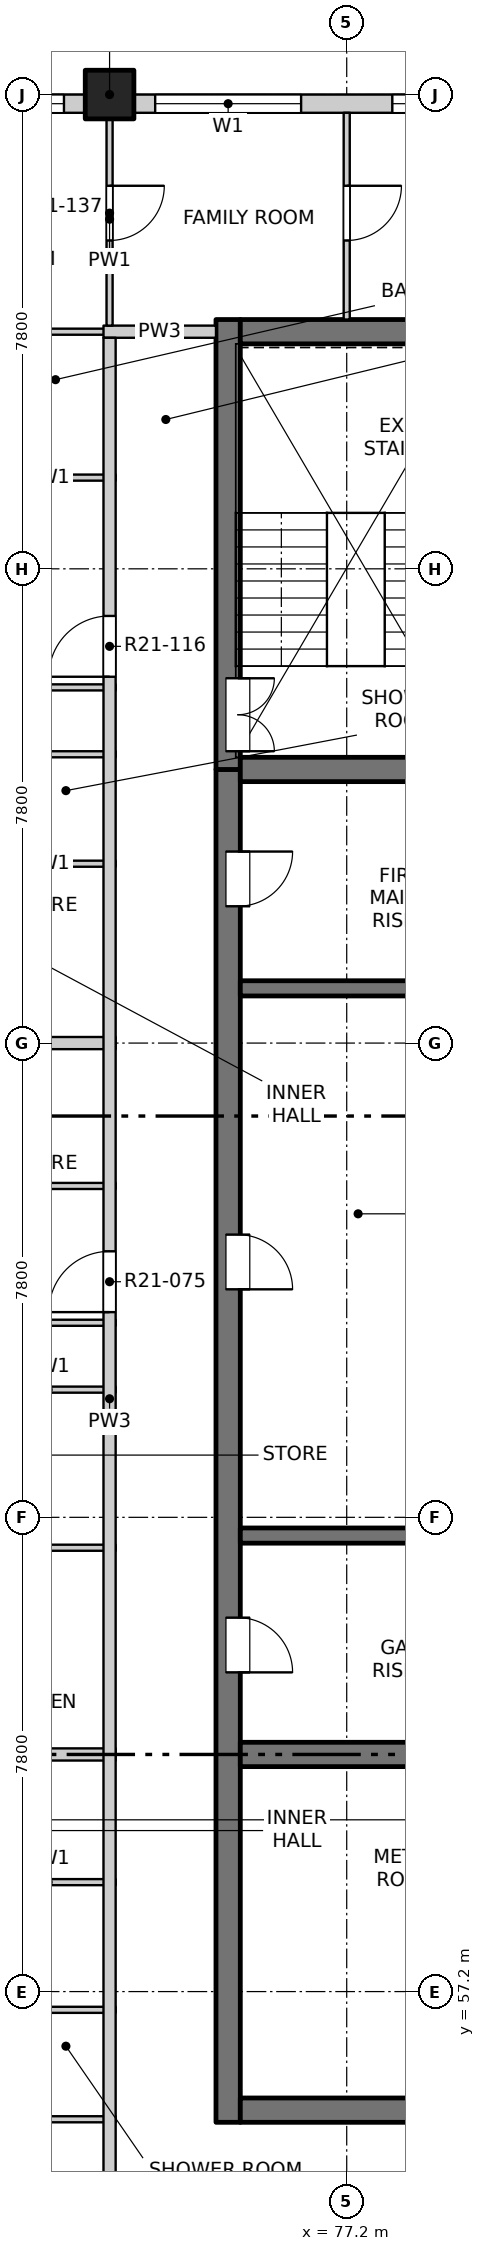
"""IFC4 building model, lengths in metres.
Left out: names, types, materials, properties, quantities, classifications, styles, units other than length and angle.
Written with IfcOpenShell. Run it as: python <this file> out.ifc"""

import sys

from ifc_helpers import new_model, si_unit, direction, frame, frame_2d, origin, origin_2d, place, context, subcontext, project, spatial, rectangle, extrude, element, fill, save


model = new_model("IFC4")
c1 = context("Model", 3, precision=1e-05, world=origin(), true_north=direction((0.0, 1.0)))
c2 = subcontext(c1, "Body", "Model", "MODEL_VIEW")
j1 = project(units=[si_unit("LENGTHUNIT", "METRE"), si_unit("PLANEANGLEUNIT", "RADIAN")], contexts=[c1])
p1 = place(None, origin())
s1 = spatial("IfcSite", under=j1, at=p1, CompositionType="ELEMENT")
p2 = place(p1, origin())
s2 = spatial("IfcBuilding", under=s1, at=p2, CompositionType="ELEMENT")
p3 = place(p2, frame((0.0, 0.0, 221.1)))
s3 = spatial("IfcBuildingStorey", under=s2, at=p3, CompositionType="ELEMENT", Elevation=221.1)
p4 = place(p3, frame((73.3, 88.4, -0.25), z_axis=(0.0, 0.0, 1.0), x_axis=(1.0, 0.0, 0.0)))
e1 = element("IfcColumn", 1, at=p4, inside=s3, PredefinedType="COLUMN", context=c2, shape_type="SweptSolid", body=[
    extrude(rectangle(XDim=0.8, YDim=0.8, at=origin_2d()), origin(), (0.0, 0.0, 1.0), 3.4),
])
p5 = place(p3, frame((75.25, 55.05, -0.25), z_axis=(0.0, 0.0, 1.0), x_axis=(0.0, 1.0, 0.0)))
e2 = element("IfcWall", 2, at=p5, inside=s3, PredefinedType="SOLIDWALL", context=c2, shape_type="SweptSolid", body=[
    extrude(rectangle(XDim=22.25, YDim=0.4, at=frame_2d((11.125, 0.0))), origin(), (0.0, 0.0, 1.0), 3.4),
])
p6 = place(p5, frame((7.4, 0.0, 0.25)))
e3 = element("IfcOpeningElement", 3, at=p6, cuts=e2, PredefinedType="OPENING", context=c2, shape_type="SweptSolid", body=[
    extrude(rectangle(XDim=0.9, YDim=2.1, at=frame_2d((0.45, 1.05))), frame((0.0, 0.21, 0.0), z_axis=(0.0, -1.0, 0.0), x_axis=(1.0, 0.0, 0.0)), (0.0, 0.0, 1.0), 0.42),
])
p7 = place(p5, frame((13.7, 0.0, 0.25)))
e4 = element("IfcOpeningElement", 4, at=p7, cuts=e2, PredefinedType="OPENING", context=c2, shape_type="SweptSolid", body=[
    extrude(rectangle(XDim=0.9, YDim=2.1, at=frame_2d((0.45, 1.05))), frame((0.0, 0.21, 0.0), z_axis=(0.0, -1.0, 0.0), x_axis=(1.0, 0.0, 0.0)), (0.0, 0.0, 1.0), 0.42),
])
p8 = place(p5, frame((20.0, 0.0, 0.25)))
e5 = element("IfcOpeningElement", 5, at=p8, cuts=e2, PredefinedType="OPENING", context=c2, shape_type="SweptSolid", body=[
    extrude(rectangle(XDim=0.9, YDim=2.1, at=frame_2d((0.45, 1.05))), frame((0.0, 0.21, 0.0), z_axis=(0.0, -1.0, 0.0), x_axis=(1.0, 0.0, 0.0)), (0.0, 0.0, 1.0), 0.42),
])
p9 = place(p3, frame((75.25, 77.3, -0.25), z_axis=(0.0, 0.0, 1.0), x_axis=(0.0, 1.0, 0.0)))
e6 = element("IfcWall", 6, at=p9, inside=s3, PredefinedType="SOLIDWALL", context=c2, shape_type="SweptSolid", body=[
    extrude(rectangle(XDim=7.4, YDim=0.4, at=frame_2d((3.7, 0.0))), origin(), (0.0, 0.0, 1.0), 3.4),
])
p10 = place(p9, frame((0.3, 0.0, 0.25)))
e7 = element("IfcOpeningElement", 7, at=p10, cuts=e6, PredefinedType="OPENING", context=c2, shape_type="SweptSolid", body=[
    extrude(rectangle(XDim=1.2, YDim=2.1, at=frame_2d((0.6, 1.05))), frame((0.0, 0.21, 0.0), z_axis=(0.0, -1.0, 0.0), x_axis=(1.0, 0.0, 0.0)), (0.0, 0.0, 1.0), 0.42),
])
p11 = place(p3, frame((75.45, 55.25, -0.25), z_axis=(0.0, 0.0, 1.0), x_axis=(1.0, 0.0, 0.0)))
e8 = element("IfcWall", 8, at=p11, inside=s3, PredefinedType="SOLIDWALL", context=c2, shape_type="SweptSolid", body=[
    extrude(rectangle(XDim=19.1, YDim=0.4, at=frame_2d((9.55, 0.0))), origin(), (0.0, 0.0, 1.0), 3.4),
])
p12 = place(p11, frame((8.8, 0.0, 0.25)))
e9 = element("IfcOpeningElement", 9, at=p12, cuts=e8, PredefinedType="OPENING", context=c2, shape_type="SweptSolid", body=[
    extrude(rectangle(XDim=1.5, YDim=2.1, at=frame_2d((0.75, 1.05))), frame((0.0, 0.21, 0.0), z_axis=(0.0, -1.0, 0.0), x_axis=(1.0, 0.0, 0.0)), (0.0, 0.0, 1.0), 0.42),
])
p13 = place(p3, frame((75.45, 84.5, -0.25), z_axis=(0.0, 0.0, 1.0), x_axis=(1.0, 0.0, 0.0)))
e10 = element("IfcWall", 10, at=p13, inside=s3, PredefinedType="SOLIDWALL", context=c2, shape_type="SweptSolid", body=[
    extrude(rectangle(XDim=19.1, YDim=0.4, at=frame_2d((9.55, 0.0))), origin(), (0.0, 0.0, 1.0), 3.4),
])
p14 = place(p3, frame((75.45, 61.1, -0.25), z_axis=(0.0, 0.0, 1.0), x_axis=(1.0, 0.0, 0.0)))
e11 = element("IfcWall", 11, at=p14, inside=s3, PredefinedType="SOLIDWALL", context=c2, shape_type="SweptSolid", body=[
    extrude(rectangle(XDim=3.875, YDim=0.4, at=frame_2d((1.938, 0.0))), origin(), (0.0, 0.0, 1.0), 3.4),
])
for number, where, z_axis, x_axis in (
    (12, (75.45, 64.7, -0.25), (0.0, 0.0, 1.0), (1.0, 0.0, 0.0)),
    (13, (75.45, 73.7, -0.25), (0.0, 0.0, 1.0), (1.0, 0.0, 0.0)),
):
    element("IfcWall", number, at=place(p3, frame(where, z_axis=z_axis, x_axis=x_axis)), inside=s3, PredefinedType="SOLIDWALL", context=c2, shape_type="SweptSolid", body=[
        extrude(rectangle(XDim=3.875, YDim=0.25, at=frame_2d((1.938, 0.0))), origin(), (0.0, 0.0, 1.0), 3.4),
    ])
p15 = place(p3, frame((75.45, 77.3, -0.25), z_axis=(0.0, 0.0, 1.0), x_axis=(1.0, 0.0, 0.0)))
e14 = element("IfcWall", 14, at=p15, inside=s3, PredefinedType="SOLIDWALL", context=c2, shape_type="SweptSolid", body=[
    extrude(rectangle(XDim=3.875, YDim=0.4, at=frame_2d((1.938, 0.0))), origin(), (0.0, 0.0, 1.0), 3.4),
])
p16 = place(p3, frame((65.5, 88.25, 0.0), z_axis=(0.0, 0.0, 1.0), x_axis=(1.0, 0.0, 0.0)))
e15 = element("IfcWall", 15, at=p16, inside=s3, PredefinedType="SOLIDWALL", context=c2, shape_type="SweptSolid", body=[
    extrude(rectangle(XDim=7.4, YDim=0.3, at=frame_2d((3.7, 0.0))), origin(), (0.0, 0.0, 1.0), 2.7),
])
p17 = place(p16, frame((0.75, 0.0, 0.9)))
e16 = element("IfcOpeningElement", 16, at=p17, cuts=e15, PredefinedType="OPENING", context=c2, shape_type="SweptSolid", body=[
    extrude(rectangle(XDim=2.4, YDim=1.8, at=frame_2d((1.2, 0.9))), frame((0.0, 0.16, 0.0), z_axis=(0.0, -1.0, 0.0), x_axis=(1.0, 0.0, 0.0)), (0.0, 0.0, 1.0), 0.32),
])
p18 = place(p16, frame((4.65, 0.0, 0.9)))
e17 = element("IfcOpeningElement", 17, at=p18, cuts=e15, PredefinedType="OPENING", context=c2, shape_type="SweptSolid", body=[
    extrude(rectangle(XDim=2.4, YDim=1.8, at=frame_2d((1.2, 0.9))), frame((0.0, 0.16, 0.0), z_axis=(0.0, -1.0, 0.0), x_axis=(1.0, 0.0, 0.0)), (0.0, 0.0, 1.0), 0.32),
])
p19 = place(p3, frame((73.7, 88.25, 0.0), z_axis=(0.0, 0.0, 1.0), x_axis=(1.0, 0.0, 0.0)))
e18 = element("IfcWall", 18, at=p19, inside=s3, PredefinedType="SOLIDWALL", context=c2, shape_type="SweptSolid", body=[
    extrude(rectangle(XDim=22.6, YDim=0.3, at=frame_2d((11.3, 0.0))), origin(), (0.0, 0.0, 1.0), 2.7),
])
p20 = place(p19, frame((0.35, 0.0, 0.9)))
e19 = element("IfcOpeningElement", 19, at=p20, cuts=e18, PredefinedType="OPENING", context=c2, shape_type="SweptSolid", body=[
    extrude(rectangle(XDim=2.4, YDim=1.8, at=frame_2d((1.2, 0.9))), frame((0.0, 0.16, 0.0), z_axis=(0.0, -1.0, 0.0), x_axis=(1.0, 0.0, 0.0)), (0.0, 0.0, 1.0), 0.32),
])
p21 = place(p19, frame((4.25, 0.0, 0.9)))
e20 = element("IfcOpeningElement", 20, at=p21, cuts=e18, PredefinedType="OPENING", context=c2, shape_type="SweptSolid", body=[
    extrude(rectangle(XDim=2.4, YDim=1.8, at=frame_2d((1.2, 0.9))), frame((0.0, 0.16, 0.0), z_axis=(0.0, -1.0, 0.0), x_axis=(1.0, 0.0, 0.0)), (0.0, 0.0, 1.0), 0.32),
])
p22 = place(p19, frame((8.15, 0.0, 0.9)))
e21 = element("IfcOpeningElement", 21, at=p22, cuts=e18, PredefinedType="OPENING", context=c2, shape_type="SweptSolid", body=[
    extrude(rectangle(XDim=2.4, YDim=1.8, at=frame_2d((1.2, 0.9))), frame((0.0, 0.16, 0.0), z_axis=(0.0, -1.0, 0.0), x_axis=(1.0, 0.0, 0.0)), (0.0, 0.0, 1.0), 0.32),
])
p23 = place(p19, frame((12.05, 0.0, 0.9)))
e22 = element("IfcOpeningElement", 22, at=p23, cuts=e18, PredefinedType="OPENING", context=c2, shape_type="SweptSolid", body=[
    extrude(rectangle(XDim=2.4, YDim=1.8, at=frame_2d((1.2, 0.9))), frame((0.0, 0.16, 0.0), z_axis=(0.0, -1.0, 0.0), x_axis=(1.0, 0.0, 0.0)), (0.0, 0.0, 1.0), 0.32),
])
p24 = place(p19, frame((15.95, 0.0, 0.9)))
e23 = element("IfcOpeningElement", 23, at=p24, cuts=e18, PredefinedType="OPENING", context=c2, shape_type="SweptSolid", body=[
    extrude(rectangle(XDim=2.4, YDim=1.8, at=frame_2d((1.2, 0.9))), frame((0.0, 0.16, 0.0), z_axis=(0.0, -1.0, 0.0), x_axis=(1.0, 0.0, 0.0)), (0.0, 0.0, 1.0), 0.32),
])
p25 = place(p19, frame((19.85, 0.0, 0.9)))
e24 = element("IfcOpeningElement", 24, at=p25, cuts=e18, PredefinedType="OPENING", context=c2, shape_type="SweptSolid", body=[
    extrude(rectangle(XDim=2.4, YDim=1.8, at=frame_2d((1.2, 0.9))), frame((0.0, 0.16, 0.0), z_axis=(0.0, -1.0, 0.0), x_axis=(1.0, 0.0, 0.0)), (0.0, 0.0, 1.0), 0.32),
])
for number, where, z_axis, x_axis in (
    (25, (71.18, 55.1, 0.0), (0.0, 0.0, 1.0), (1.0, 0.0, 0.0)),
    (26, (71.18, 56.9, 0.0), (0.0, 0.0, 1.0), (1.0, 0.0, 0.0)),
    (27, (71.18, 59.0, 0.0), (0.0, 0.0, 1.0), (1.0, 0.0, 0.0)),
):
    element("IfcWall", number, at=place(p3, frame(where, z_axis=z_axis, x_axis=x_axis)), inside=s3, PredefinedType="PARTITIONING", context=c2, shape_type="SweptSolid", body=[
        extrude(rectangle(XDim=2.22, YDim=0.1, at=frame_2d((1.11, 0.0))), origin(), (0.0, 0.0, 1.0), 3.15),
    ])
p26 = place(p3, frame((61.9, 61.1, 0.0), z_axis=(0.0, 0.0, 1.0), x_axis=(1.0, 0.0, 0.0)))
e28 = element("IfcWall", 28, at=p26, inside=s3, PredefinedType="PARTITIONING", context=c2, shape_type="SweptSolid", body=[
    extrude(rectangle(XDim=11.5, YDim=0.2, at=frame_2d((5.75, 0.0))), origin(), (0.0, 0.0, 1.0), 2.55),
])
for number, where, z_axis, x_axis in (
    (29, (71.18, 64.5, 0.0), (0.0, 0.0, 1.0), (1.0, 0.0, 0.0)),
    (30, (71.18, 67.1, 0.0), (0.0, 0.0, 1.0), (1.0, 0.0, 0.0)),
    (31, (71.18, 68.2, 0.0), (0.0, 0.0, 1.0), (1.0, 0.0, 0.0)),
    (32, (71.18, 70.45, 0.0), (0.0, 0.0, 1.0), (1.0, 0.0, 0.0)),
):
    element("IfcWall", number, at=place(p3, frame(where, z_axis=z_axis, x_axis=x_axis)), inside=s3, PredefinedType="PARTITIONING", context=c2, shape_type="SweptSolid", body=[
        extrude(rectangle(XDim=2.22, YDim=0.1, at=frame_2d((1.11, 0.0))), origin(), (0.0, 0.0, 1.0), 3.15),
    ])
p27 = place(p3, frame((61.9, 72.8, 0.0), z_axis=(0.0, 0.0, 1.0), x_axis=(1.0, 0.0, 0.0)))
e33 = element("IfcWall", 33, at=p27, inside=s3, PredefinedType="PARTITIONING", context=c2, shape_type="SweptSolid", body=[
    extrude(rectangle(XDim=11.5, YDim=0.2, at=frame_2d((5.75, 0.0))), origin(), (0.0, 0.0, 1.0), 3.15),
])
for number, where, z_axis, x_axis in (
    (34, (71.18, 75.75, 0.0), (0.0, 0.0, 1.0), (1.0, 0.0, 0.0)),
    (35, (71.18, 77.55, 0.0), (0.0, 0.0, 1.0), (1.0, 0.0, 0.0)),
    (36, (71.18, 78.65, 0.0), (0.0, 0.0, 1.0), (1.0, 0.0, 0.0)),
    (37, (71.18, 82.1, 0.0), (0.0, 0.0, 1.0), (1.0, 0.0, 0.0)),
):
    element("IfcWall", number, at=place(p3, frame(where, z_axis=z_axis, x_axis=x_axis)), inside=s3, PredefinedType="PARTITIONING", context=c2, shape_type="SweptSolid", body=[
        extrude(rectangle(XDim=2.22, YDim=0.1, at=frame_2d((1.11, 0.0))), origin(), (0.0, 0.0, 1.0), 3.15),
    ])
p28 = place(p3, frame((61.9, 84.5, 0.0), z_axis=(0.0, 0.0, 1.0), x_axis=(1.0, 0.0, 0.0)))
e38 = element("IfcWall", 38, at=p28, inside=s3, PredefinedType="PARTITIONING", context=c2, shape_type="SweptSolid", body=[
    extrude(rectangle(XDim=11.5, YDim=0.1, at=frame_2d((5.75, 0.0))), origin(), (0.0, 0.0, 1.0), 3.15),
])
p29 = place(p28, frame((7.965, 0.0, 0.0)))
e39 = element("IfcOpeningElement", 39, at=p29, cuts=e38, PredefinedType="OPENING", context=c2, shape_type="SweptSolid", body=[
    extrude(rectangle(XDim=0.9, YDim=2.1, at=frame_2d((0.45, 1.05))), frame((0.0, 0.06, 0.0), z_axis=(0.0, -1.0, 0.0), x_axis=(1.0, 0.0, 0.0)), (0.0, 0.0, 1.0), 0.12),
])
p30 = place(p3, frame((73.2, 84.5, 0.0), z_axis=(0.0, 0.0, 1.0), x_axis=(1.0, 0.0, 0.0)))
e40 = element("IfcWall", 40, at=p30, inside=s3, PredefinedType="PARTITIONING", context=c2, shape_type="SweptSolid", body=[
    extrude(rectangle(XDim=1.85, YDim=0.2, at=frame_2d((0.925, 0.0))), origin(), (0.0, 0.0, 1.0), 3.15),
])
p31 = place(p3, frame((73.3, 49.5, 0.0), z_axis=(0.0, 0.0, 1.0), x_axis=(0.0, 1.0, 0.0)))
e41 = element("IfcWall", 41, at=p31, inside=s3, PredefinedType="PARTITIONING", context=c2, shape_type="SweptSolid", body=[
    extrude(rectangle(XDim=34.9, YDim=0.2, at=frame_2d((17.45, 0.0))), origin(), (0.0, 0.0, 1.0), 3.15),
])
p32 = place(p31, frame((3.325, 0.0, 0.0)))
e42 = element("IfcOpeningElement", 42, at=p32, cuts=e41, PredefinedType="OPENING", context=c2, shape_type="SweptSolid", body=[
    extrude(rectangle(XDim=1.0, YDim=2.1, at=frame_2d((0.5, 1.05))), frame((0.0, 0.11, 0.0), z_axis=(0.0, -1.0, 0.0), x_axis=(1.0, 0.0, 0.0)), (0.0, 0.0, 1.0), 0.22),
])
p33 = place(p31, frame((18.875, 0.0, 0.0)))
e43 = element("IfcOpeningElement", 43, at=p33, cuts=e41, PredefinedType="OPENING", context=c2, shape_type="SweptSolid", body=[
    extrude(rectangle(XDim=1.0, YDim=2.1, at=frame_2d((0.5, 1.05))), frame((0.0, 0.11, 0.0), z_axis=(0.0, -1.0, 0.0), x_axis=(1.0, 0.0, 0.0)), (0.0, 0.0, 1.0), 0.22),
])
p34 = place(p31, frame((29.325, 0.0, 0.0)))
e44 = element("IfcOpeningElement", 44, at=p34, cuts=e41, PredefinedType="OPENING", context=c2, shape_type="SweptSolid", body=[
    extrude(rectangle(XDim=1.0, YDim=2.1, at=frame_2d((0.5, 1.05))), frame((0.0, 0.11, 0.0), z_axis=(0.0, -1.0, 0.0), x_axis=(1.0, 0.0, 0.0)), (0.0, 0.0, 1.0), 0.22),
])
p35 = place(p3, frame((73.3, 84.6, 0.0), z_axis=(0.0, 0.0, 1.0), x_axis=(0.0, 1.0, 0.0)))
e45 = element("IfcWall", 45, at=p35, inside=s3, PredefinedType="PARTITIONING", context=c2, shape_type="SweptSolid", body=[
    extrude(rectangle(XDim=3.5, YDim=0.1, at=frame_2d((1.75, 0.0))), origin(), (0.0, 0.0, 1.0), 3.15),
])
p36 = place(p35, frame((1.4, 0.0, 0.0)))
e46 = element("IfcOpeningElement", 46, at=p36, cuts=e45, PredefinedType="OPENING", context=c2, shape_type="SweptSolid", body=[
    extrude(rectangle(XDim=0.9, YDim=2.1, at=frame_2d((0.45, 1.05))), frame((0.0, 0.06, 0.0), z_axis=(0.0, -1.0, 0.0), x_axis=(1.0, 0.0, 0.0)), (0.0, 0.0, 1.0), 0.12),
])
p37 = place(p3, frame((77.2, 84.7, 0.0), z_axis=(0.0, 0.0, 1.0), x_axis=(0.0, 1.0, 0.0)))
e47 = element("IfcWall", 47, at=p37, inside=s3, PredefinedType="PARTITIONING", context=c2, shape_type="SweptSolid", body=[
    extrude(rectangle(XDim=3.4, YDim=0.1, at=frame_2d((1.7, 0.0))), origin(), (0.0, 0.0, 1.0), 3.15),
])
p38 = place(p37, frame((1.3, 0.0, 0.0)))
e48 = element("IfcOpeningElement", 48, at=p38, cuts=e47, PredefinedType="OPENING", context=c2, shape_type="SweptSolid", body=[
    extrude(rectangle(XDim=0.9, YDim=2.1, at=frame_2d((0.45, 1.05))), frame((0.0, 0.06, 0.0), z_axis=(0.0, -1.0, 0.0), x_axis=(1.0, 0.0, 0.0)), (0.0, 0.0, 1.0), 0.12),
])
p39 = place(p18, origin())
e49 = element("IfcWindow", 49, at=p39, inside=s3, PartitioningType="DOUBLE_PANEL_VERTICAL", PredefinedType="WINDOW", context=c2, shape_type="SweptSolid", body=[
    extrude(rectangle(XDim=2.4, YDim=1.8, at=frame_2d((1.2, 0.9))), frame((0.0, 0.03, 0.0), z_axis=(0.0, -1.0, 0.0), x_axis=(1.0, 0.0, 0.0)), (0.0, 0.0, 1.0), 0.06),
])
fill(e17, e49)
p40 = place(p20, origin())
e50 = element("IfcWindow", 50, at=p40, inside=s3, PartitioningType="DOUBLE_PANEL_VERTICAL", PredefinedType="WINDOW", context=c2, shape_type="SweptSolid", body=[
    extrude(rectangle(XDim=2.4, YDim=1.8, at=frame_2d((1.2, 0.9))), frame((0.0, 0.03, 0.0), z_axis=(0.0, -1.0, 0.0), x_axis=(1.0, 0.0, 0.0)), (0.0, 0.0, 1.0), 0.06),
])
fill(e19, e50)
p41 = place(p21, origin())
e51 = element("IfcWindow", 51, at=p41, inside=s3, PartitioningType="DOUBLE_PANEL_VERTICAL", PredefinedType="WINDOW", context=c2, shape_type="SweptSolid", body=[
    extrude(rectangle(XDim=2.4, YDim=1.8, at=frame_2d((1.2, 0.9))), frame((0.0, 0.03, 0.0), z_axis=(0.0, -1.0, 0.0), x_axis=(1.0, 0.0, 0.0)), (0.0, 0.0, 1.0), 0.06),
])
fill(e20, e51)
p42 = place(p6, origin())
e52 = element("IfcDoor", 52, at=p42, inside=s3, OperationType="SINGLE_SWING_RIGHT", PredefinedType="DOOR", context=c2, shape_type="SweptSolid", body=[
    extrude(rectangle(XDim=0.9, YDim=2.1, at=frame_2d((0.45, 1.05))), frame((0.0, -0.135, 0.0), z_axis=(0.0, -1.0, 0.0), x_axis=(1.0, 0.0, 0.0)), (0.0, 0.0, 1.0), 0.05),
])
fill(e3, e52)
p43 = place(p33, origin())
e53 = element("IfcDoor", 53, at=p43, inside=s3, OperationType="SINGLE_SWING_RIGHT", PredefinedType="DOOR", context=c2, shape_type="SweptSolid", body=[
    extrude(rectangle(XDim=1.0, YDim=2.1, at=frame_2d((0.5, 1.05))), frame((0.0, 0.025, 0.0), z_axis=(0.0, -1.0, 0.0), x_axis=(1.0, 0.0, 0.0)), (0.0, 0.0, 1.0), 0.05),
])
fill(e43, e53)
p44 = place(p7, origin())
e54 = element("IfcDoor", 54, at=p44, inside=s3, OperationType="SINGLE_SWING_RIGHT", PredefinedType="DOOR", context=c2, shape_type="SweptSolid", body=[
    extrude(rectangle(XDim=0.9, YDim=2.1, at=frame_2d((0.45, 1.05))), frame((0.0, -0.135, 0.0), z_axis=(0.0, -1.0, 0.0), x_axis=(1.0, 0.0, 0.0)), (0.0, 0.0, 1.0), 0.05),
])
fill(e4, e54)
p45 = place(p8, origin())
e55 = element("IfcDoor", 55, at=p45, inside=s3, OperationType="SINGLE_SWING_LEFT", PredefinedType="DOOR", context=c2, shape_type="SweptSolid", body=[
    extrude(rectangle(XDim=0.9, YDim=2.1, at=frame_2d((0.45, 1.05))), frame((0.0, -0.135, 0.0), z_axis=(0.0, -1.0, 0.0), x_axis=(1.0, 0.0, 0.0)), (0.0, 0.0, 1.0), 0.05),
])
fill(e5, e55)
p46 = place(p10, origin())
e56 = element("IfcDoor", 56, at=p46, inside=s3, OperationType="DOUBLE_DOOR_SINGLE_SWING", PredefinedType="DOOR", context=c2, shape_type="SweptSolid", body=[
    extrude(rectangle(XDim=1.2, YDim=2.1, at=frame_2d((0.6, 1.05))), frame((0.0, -0.135, 0.0), z_axis=(0.0, -1.0, 0.0), x_axis=(1.0, 0.0, 0.0)), (0.0, 0.0, 1.0), 0.05),
])
fill(e7, e56)
p47 = place(p34, origin())
e57 = element("IfcDoor", 57, at=p47, inside=s3, OperationType="SINGLE_SWING_RIGHT", PredefinedType="DOOR", context=c2, shape_type="SweptSolid", body=[
    extrude(rectangle(XDim=1.0, YDim=2.1, at=frame_2d((0.5, 1.05))), frame((0.0, 0.025, 0.0), z_axis=(0.0, -1.0, 0.0), x_axis=(1.0, 0.0, 0.0)), (0.0, 0.0, 1.0), 0.05),
])
fill(e44, e57)
p48 = place(p36, origin())
e58 = element("IfcDoor", 58, at=p48, inside=s3, OperationType="SINGLE_SWING_LEFT", PredefinedType="DOOR", context=c2, shape_type="SweptSolid", body=[
    extrude(rectangle(XDim=0.9, YDim=2.1, at=frame_2d((0.45, 1.05))), frame((0.0, 0.025, 0.0), z_axis=(0.0, -1.0, 0.0), x_axis=(1.0, 0.0, 0.0)), (0.0, 0.0, 1.0), 0.05),
])
fill(e46, e58)
p49 = place(p38, origin())
e59 = element("IfcDoor", 59, at=p49, inside=s3, OperationType="SINGLE_SWING_LEFT", PredefinedType="DOOR", context=c2, shape_type="SweptSolid", body=[
    extrude(rectangle(XDim=0.9, YDim=2.1, at=frame_2d((0.45, 1.05))), frame((0.0, 0.025, 0.0), z_axis=(0.0, -1.0, 0.0), x_axis=(1.0, 0.0, 0.0)), (0.0, 0.0, 1.0), 0.05),
])
fill(e48, e59)
save(model, sys.argv[1])
